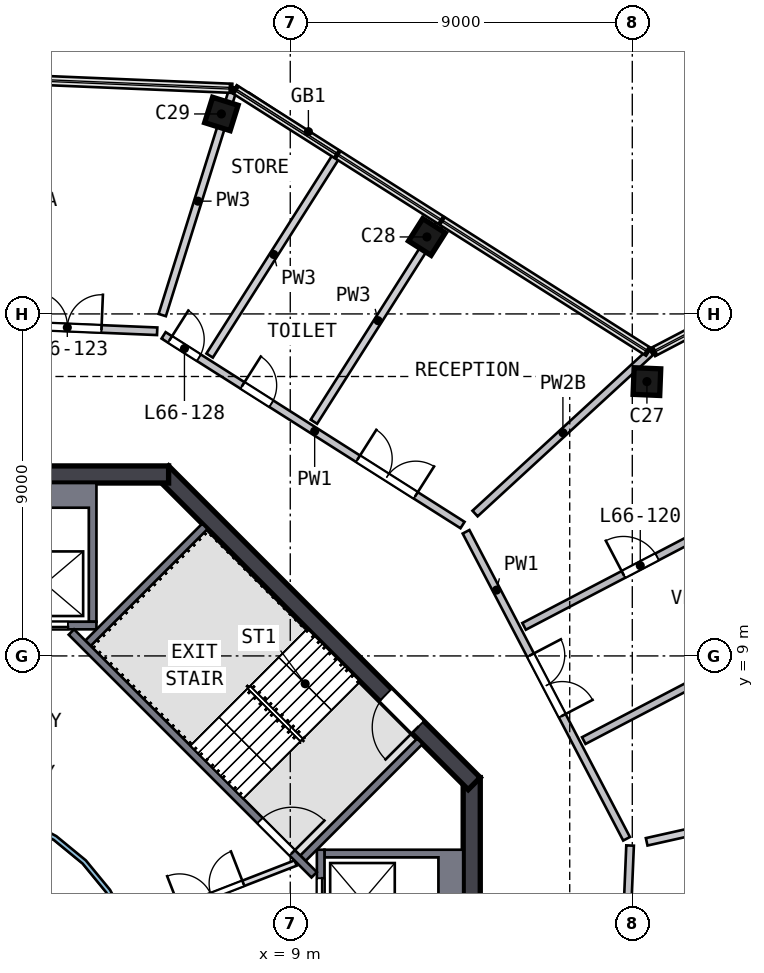
"""IFC4 building model, lengths in metres.
Left out: names, types, materials, properties, quantities, classifications, styles, units other than length and angle.
Written with IfcOpenShell. Run it as: python <this file> out.ifc"""

import sys

from ifc_helpers import new_model, si_unit, direction, frame, frame_2d, origin, origin_2d, place, context, subcontext, project, spatial, polyline, rectangle, outline, extrude, element, fill, save


model = new_model("IFC4")
c1 = context("Model", 3, precision=1e-05, world=origin(), true_north=direction((0.0, 1.0)))
c2 = subcontext(c1, "Body", "Model", "MODEL_VIEW")
j1 = project(units=[si_unit("LENGTHUNIT", "METRE"), si_unit("PLANEANGLEUNIT", "RADIAN")], contexts=[c1])
p1 = place(None, origin())
s1 = spatial("IfcSite", under=j1, at=p1, CompositionType="ELEMENT")
p2 = place(p1, origin())
s2 = spatial("IfcBuilding", under=s1, at=p2, CompositionType="ELEMENT")
p3 = place(p2, frame((0.0, 0.0, 269.0)))
s3 = spatial("IfcBuildingStorey", under=s2, at=p3, CompositionType="ELEMENT", Elevation=269.0)
p4 = place(p3, frame((18.451, 16.146, 0.0), z_axis=(-0.05447554, 0.061116367, 0.996642968), x_axis=(0.997671523, -0.037688421, 0.056842897)))
e1 = element("IfcColumn", 1, at=p4, inside=s3, PredefinedType="COLUMN", context=c2, shape_type="SweptSolid", body=[
    extrude(rectangle(XDim=0.7, YDim=0.7, at=origin_2d()), origin(), (0.0, 0.0, 1.0), 4.706),
])
p5 = place(p3, frame((12.677, 19.975, 0.0), z_axis=(-0.067097972, 0.041825959, 0.996869325), x_axis=(-0.841492395, 0.534452469, -0.079063944)))
e2 = element("IfcColumn", 2, at=p5, inside=s3, PredefinedType="COLUMN", context=c2, shape_type="SweptSolid", body=[
    extrude(rectangle(XDim=0.7, YDim=0.7, at=origin_2d()), origin(), (0.0, 0.0, 1.0), 4.705),
])
p6 = place(p3, frame((7.281, 23.234, 0.0), z_axis=(-0.077825577, 0.023658975, 0.996686226), x_axis=(0.951117562, -0.297924961, 0.081339413)))
e3 = element("IfcColumn", 3, at=p6, inside=s3, PredefinedType="COLUMN", context=c2, shape_type="SweptSolid", body=[
    extrude(rectangle(XDim=0.7, YDim=0.7, at=origin_2d()), origin(), (0.0, 0.0, 1.0), 4.706),
])
p7 = place(p3, frame((13.775, -5.799, 0.0), z_axis=(0.0, 0.0, 1.0), x_axis=(0.0, 1.0, 0.0)))
e4 = element("IfcWall", 4, at=p7, inside=s3, PredefinedType="SHEAR", context=c2, shape_type="SweptSolid", body=[
    extrude(rectangle(XDim=11.598, YDim=0.45, at=frame_2d((5.799, 0.0))), origin(), (0.0, 0.0, 1.0), 5.0),
])
p8 = place(p7, frame((4.899, 0.0, 0.0)))
e5 = element("IfcOpeningElement", 5, at=p8, cuts=e4, PredefinedType="OPENING", context=c2, shape_type="SweptSolid", body=[
    extrude(rectangle(XDim=1.8, YDim=2.1, at=frame_2d((0.9, 1.05))), frame((0.0, 0.235, 0.0), z_axis=(0.0, -1.0, 0.0), x_axis=(1.0, 0.0, 0.0)), (0.0, 0.0, 1.0), 0.47),
])
p9 = place(p3, frame((13.841, 5.64, 0.0), z_axis=(0.0, 0.0, 1.0), x_axis=(-0.707106781, 0.707106781, 0.0)))
e6 = element("IfcWall", 6, at=p9, inside=s3, PredefinedType="SHEAR", context=c2, shape_type="SweptSolid", body=[
    extrude(rectangle(XDim=11.598, YDim=0.45, at=frame_2d((5.799, 0.0))), origin(), (0.0, 0.0, 1.0), 5.0),
])
p10 = place(p9, frame((2.099, 0.0, 0.0)))
e7 = element("IfcOpeningElement", 7, at=p10, cuts=e6, PredefinedType="OPENING", context=c2, shape_type="SweptSolid", body=[
    extrude(rectangle(XDim=1.2, YDim=2.1, at=frame_2d((0.6, 1.05))), frame((0.0, 0.235, 0.0), z_axis=(0.0, -1.0, 0.0), x_axis=(1.0, 0.0, 0.0)), (0.0, 0.0, 1.0), 0.47),
])
p11 = place(p3, frame((5.799, 13.775, 0.0), z_axis=(0.0, 0.0, 1.0), x_axis=(-1.0, 0.0, 0.0)))
e8 = element("IfcWall", 8, at=p11, inside=s3, PredefinedType="SHEAR", context=c2, shape_type="SweptSolid", body=[
    extrude(rectangle(XDim=11.598, YDim=0.45, at=frame_2d((5.799, 0.0))), origin(), (0.0, 0.0, 1.0), 5.0),
])
p12 = place(p11, frame((4.899, 0.0, 0.0)))
e9 = element("IfcOpeningElement", 9, at=p12, cuts=e8, PredefinedType="OPENING", context=c2, shape_type="SweptSolid", body=[
    extrude(rectangle(XDim=1.8, YDim=2.1, at=frame_2d((0.9, 1.05))), frame((0.0, 0.235, 0.0), z_axis=(0.0, -1.0, 0.0), x_axis=(1.0, 0.0, 0.0)), (0.0, 0.0, 1.0), 0.47),
])
p13 = place(p3, origin())
e10 = element("IfcWall", 10, at=p13, inside=s3, PredefinedType="SOLIDWALL", context=c2, shape_type="SweptSolid", body=[
    extrude(outline(polyline([(13.55, 3.9), (13.55, 1.2), (9.9, 1.2), (9.9, 1.4), (12.9, 1.4), (12.9, 3.7), (9.9, 3.7), (9.9, 3.9), (13.55, 3.9)])), origin(), (0.0, 0.0, 1.0), 4.69),
])
p14 = place(p3, frame((9.8, 1.2, 0.0), z_axis=(0.0, 0.0, 1.0), x_axis=(0.0, 1.0, 0.0)))
e11 = element("IfcWall", 11, at=p14, inside=s3, PredefinedType="SOLIDWALL", context=c2, shape_type="SweptSolid", body=[
    extrude(rectangle(XDim=2.7, YDim=0.2, at=frame_2d((1.35, 0.0))), origin(), (0.0, 0.0, 1.0), 4.69),
])
p15 = place(p14, frame((0.75, 0.0, 0.0)))
e12 = element("IfcOpeningElement", 12, at=p15, cuts=e11, PredefinedType="OPENING", context=c2, shape_type="SweptSolid", body=[
    extrude(rectangle(XDim=1.2, YDim=2.1, at=frame_2d((0.6, 1.05))), frame((0.0, 0.11, 0.0), z_axis=(0.0, -1.0, 0.0), x_axis=(1.0, 0.0, 0.0)), (0.0, 0.0, 1.0), 0.22),
])
p16 = place(p3, origin())
e13 = element("IfcWall", 13, at=p16, inside=s3, PredefinedType="SOLIDWALL", context=c2, shape_type="SweptSolid", body=[
    extrude(outline(polyline([(3.9, 9.9), (3.7, 9.9), (3.7, 12.9), (1.4, 12.9), (1.4, 9.9), (1.2, 9.9), (1.2, 13.55), (3.9, 13.55), (3.9, 9.9)])), origin(), (0.0, 0.0, 1.0), 4.69),
])
p17 = place(p3, frame((1.2, 9.8, 0.0), z_axis=(0.0, 0.0, 1.0), x_axis=(1.0, 0.0, 0.0)))
e14 = element("IfcWall", 14, at=p17, inside=s3, PredefinedType="SOLIDWALL", context=c2, shape_type="SweptSolid", body=[
    extrude(rectangle(XDim=2.7, YDim=0.2, at=frame_2d((1.35, 0.0))), origin(), (0.0, 0.0, 1.0), 4.69),
])
p18 = place(p17, frame((0.75, 0.0, 0.0)))
e15 = element("IfcOpeningElement", 15, at=p18, cuts=e14, PredefinedType="OPENING", context=c2, shape_type="SweptSolid", body=[
    extrude(rectangle(XDim=1.2, YDim=2.1, at=frame_2d((0.6, 1.05))), frame((0.0, 0.11, 0.0), z_axis=(0.0, -1.0, 0.0), x_axis=(1.0, 0.0, 0.0)), (0.0, 0.0, 1.0), 0.22),
])
p19 = place(p3, frame((3.24, 9.629, 0.0), z_axis=(0.0, 0.0, 1.0), x_axis=(0.707106781, -0.707106781, 0.0)))
e16 = element("IfcWall", 16, at=p19, inside=s3, PredefinedType="SOLIDWALL", context=c2, shape_type="SweptSolid", body=[
    extrude(rectangle(XDim=9.036, YDim=0.2, at=frame_2d((4.518, 0.0))), origin(), (0.0, 0.0, 1.0), 4.69),
])
p20 = place(p19, frame((7.018, 0.0, 0.0)))
e17 = element("IfcOpeningElement", 17, at=p20, cuts=e16, PredefinedType="OPENING", context=c2, shape_type="SweptSolid", body=[
    extrude(rectangle(XDim=1.2, YDim=2.1, at=frame_2d((0.6, 1.05))), frame((0.0, 0.11, 0.0), z_axis=(0.0, -1.0, 0.0), x_axis=(1.0, 0.0, 0.0)), (0.0, 0.0, 1.0), 0.22),
])
for number, where, z_axis, x_axis in (
    (18, (9.334, 3.677, 0.0), (0.0, 0.0, 1.0), (0.707, 0.707, 0.0)),
    (19, (3.677, 9.334, 0.0), (0.0, 0.0, 1.0), (0.707, 0.707, 0.0)),
):
    element("IfcWall", number, at=place(p3, frame(where, z_axis=z_axis, x_axis=x_axis)), inside=s3, PredefinedType="SOLIDWALL", context=c2, shape_type="SweptSolid", body=[
        extrude(rectangle(XDim=4.35, YDim=0.2, at=frame_2d((2.175, 0.0))), origin(), (0.0, 0.0, 1.0), 4.69),
    ])
p21 = place(p3, frame((4.782, 1.857, 0.0), z_axis=(0.0, 0.0, 1.0), x_axis=(0.932167228, 0.36202798, 0.0)))
e20 = element("IfcWall", 20, at=p21, inside=s3, PredefinedType="PARTITIONING", context=c2, shape_type="SweptSolid", body=[
    extrude(rectangle(XDim=4.676, YDim=0.15, at=frame_2d((2.338, 0.0))), origin(), (0.0, 0.0, 1.0), 4.69),
])
p22 = place(p21, frame((1.4, 0.0, 0.0)))
e21 = element("IfcOpeningElement", 21, at=p22, cuts=e20, PredefinedType="OPENING", context=c2, shape_type="SweptSolid", body=[
    extrude(rectangle(XDim=1.8, YDim=2.1, at=frame_2d((0.9, 1.05))), frame((0.0, 0.085, 0.0), z_axis=(0.0, -1.0, 0.0), x_axis=(1.0, 0.0, 0.0)), (0.0, 0.0, 1.0), 0.17),
])
p23 = place(p3, origin())
e22 = element("IfcWall", 22, at=p23, inside=s3, PredefinedType="SOLIDWALL", context=c2, shape_type="SweptSolid", body=[
    extrude(outline(polyline([(5.021, -0.999), (4.73, -1.959), (4.257, -2.844), (3.62, -3.62), (2.844, -4.257), (1.959, -4.73), (0.999, -5.021), (0.0, -5.12), (-0.999, -5.021), (-1.959, -4.73), (-2.844, -4.257), (-3.62, -3.62), (-4.257, -2.844), (-4.73, -1.959), (-5.021, -0.999), (-5.12, 0.0), (-5.021, 0.999), (-4.73, 1.959), (-4.257, 2.844), (-3.62, 3.62), (-2.844, 4.257), (-1.959, 4.73), (-0.999, 5.021), (0.0, 5.12), (0.999, 5.021), (1.959, 4.73), (2.844, 4.257), (3.62, 3.62), (4.257, 2.844), (4.73, 1.959), (5.021, 0.999), (5.12, 0.0), (5.021, -0.999)]), holes=[polyline([(4.904, 0.976), (4.619, 1.913), (4.157, 2.778), (3.535, 3.535), (2.778, 4.157), (1.913, 4.619), (0.976, 4.904), (0.0, 5.0), (-0.976, 4.904), (-1.913, 4.619), (-2.778, 4.157), (-3.535, 3.535), (-4.157, 2.778), (-4.619, 1.913), (-4.904, 0.976), (-5.0, 0.0), (-4.904, -0.976), (-4.619, -1.913), (-4.157, -2.778), (-3.535, -3.535), (-2.778, -4.157), (-1.913, -4.619), (-0.976, -4.904), (0.0, -5.0), (0.976, -4.904), (1.913, -4.619), (2.778, -4.157), (3.535, -3.535), (4.157, -2.778), (4.619, -1.913), (4.904, -0.976), (5.0, 0.0), (4.904, 0.976)])]), origin(), (0.0, 0.0, 1.0), 4.69),
])
p24 = place(p3, frame((-4.01, 17.942, 0.0), z_axis=(0.0, 0.0, 1.0), x_axis=(0.999123175, -0.041867432, 0.0)))
e23 = element("IfcWall", 23, at=p24, inside=s3, PredefinedType="SOLIDWALL", context=c2, shape_type="SweptSolid", body=[
    extrude(rectangle(XDim=9.517, YDim=0.2, at=frame_2d((4.758, 0.0))), origin(), (0.0, 0.0, 1.0), 4.69),
])
p25 = place(p24, frame((6.25, 0.0, 0.0)))
e24 = element("IfcOpeningElement", 24, at=p25, cuts=e23, PredefinedType="OPENING", context=c2, shape_type="SweptSolid", body=[
    extrude(rectangle(XDim=1.8, YDim=2.1, at=frame_2d((0.9, 1.05))), frame((0.0, 0.11, 0.0), z_axis=(0.0, -1.0, 0.0), x_axis=(1.0, 0.0, 0.0)), (0.0, 0.0, 1.0), 0.22),
])
p26 = place(p3, frame((5.667, 17.436, 0.0), z_axis=(0.0, 0.0, 1.0), x_axis=(0.844321212, -0.535837373, 0.0)))
e25 = element("IfcWall", 25, at=p26, inside=s3, PredefinedType="SOLIDWALL", context=c2, shape_type="SweptSolid", body=[
    extrude(rectangle(XDim=9.317, YDim=0.2, at=frame_2d((4.658, 0.0))), origin(), (0.0, 0.0, 1.0), 4.69),
])
p27 = place(p26, frame((6.058, 0.0, 0.0)))
e26 = element("IfcOpeningElement", 26, at=p27, cuts=e25, PredefinedType="OPENING", context=c2, shape_type="SweptSolid", body=[
    extrude(rectangle(XDim=1.8, YDim=2.1, at=frame_2d((0.9, 1.05))), frame((0.0, 0.11, 0.0), z_axis=(0.0, -1.0, 0.0), x_axis=(1.0, 0.0, 0.0)), (0.0, 0.0, 1.0), 0.22),
])
p28 = place(p26, frame((2.458, 0.0, 0.0)))
e27 = element("IfcOpeningElement", 27, at=p28, cuts=e25, PredefinedType="OPENING", context=c2, shape_type="SweptSolid", body=[
    extrude(rectangle(XDim=0.9, YDim=2.1, at=frame_2d((0.45, 1.05))), frame((0.0, 0.11, 0.0), z_axis=(0.0, -1.0, 0.0), x_axis=(1.0, 0.0, 0.0)), (0.0, 0.0, 1.0), 0.22),
])
p29 = place(p26, frame((0.2, 0.0, 0.0)))
e28 = element("IfcOpeningElement", 28, at=p29, cuts=e25, PredefinedType="OPENING", context=c2, shape_type="SweptSolid", body=[
    extrude(rectangle(XDim=0.9, YDim=2.1, at=frame_2d((0.45, 1.05))), frame((0.0, 0.11, 0.0), z_axis=(0.0, -1.0, 0.0), x_axis=(1.0, 0.0, 0.0)), (0.0, 0.0, 1.0), 0.22),
])
p30 = place(p3, frame((13.625, 12.267, 0.0), z_axis=(0.0, 0.0, 1.0), x_axis=(0.463304399, -0.886199207, 0.0)))
e29 = element("IfcWall", 29, at=p30, inside=s3, PredefinedType="SOLIDWALL", context=c2, shape_type="SweptSolid", body=[
    extrude(rectangle(XDim=9.117, YDim=0.2, at=frame_2d((4.559, 0.0))), origin(), (0.0, 0.0, 1.0), 4.69),
])
p31 = place(p30, frame((3.663, 0.0, 0.0)))
e30 = element("IfcOpeningElement", 30, at=p31, cuts=e29, PredefinedType="OPENING", context=c2, shape_type="SweptSolid", body=[
    extrude(rectangle(XDim=1.8, YDim=2.1, at=frame_2d((0.9, 1.05))), frame((0.0, 0.11, 0.0), z_axis=(0.0, -1.0, 0.0), x_axis=(1.0, 0.0, 0.0)), (0.0, 0.0, 1.0), 0.22),
])
p32 = place(p3, frame((17.942, 4.01, 0.0), z_axis=(0.0, 0.0, 1.0), x_axis=(-0.041851823, -0.999123829, 0.0)))
e31 = element("IfcWall", 31, at=p32, inside=s3, PredefinedType="SOLIDWALL", context=c2, shape_type="SweptSolid", body=[
    extrude(rectangle(XDim=9.316, YDim=0.2, at=frame_2d((4.658, 0.0))), origin(), (0.0, 0.0, 1.0), 4.69),
])
p33 = place(p32, frame((6.258, 0.0, 0.0)))
e32 = element("IfcOpeningElement", 32, at=p33, cuts=e31, PredefinedType="OPENING", context=c2, shape_type="SweptSolid", body=[
    extrude(rectangle(XDim=1.8, YDim=2.1, at=frame_2d((0.9, 1.05))), frame((0.0, 0.11, 0.0), z_axis=(0.0, -1.0, 0.0), x_axis=(1.0, 0.0, 0.0)), (0.0, 0.0, 1.0), 0.22),
])
p34 = place(p32, frame((1.95, 0.0, 0.0)))
e33 = element("IfcOpeningElement", 33, at=p34, cuts=e31, PredefinedType="OPENING", context=c2, shape_type="SweptSolid", body=[
    extrude(rectangle(XDim=0.9, YDim=2.1, at=frame_2d((0.45, 1.05))), frame((0.0, 0.11, 0.0), z_axis=(0.0, -1.0, 0.0), x_axis=(1.0, 0.0, 0.0)), (0.0, 0.0, 1.0), 0.22),
])
p35 = place(p3, frame((13.862, 12.747, 0.0), z_axis=(0.0, 0.0, 1.0), x_axis=(0.736082037, 0.676892336, 0.0)))
e34 = element("IfcWall", 34, at=p35, inside=s3, PredefinedType="SOLIDWALL", context=c2, shape_type="SweptSolid", body=[
    extrude(rectangle(XDim=6.282, YDim=0.2, at=frame_2d((3.141, 0.0))), origin(), (0.0, 0.0, 1.0), 4.19),
])
p36 = place(p3, frame((15.153, 9.778, 0.0), z_axis=(0.0, 0.0, 1.0), x_axis=(0.886198556, 0.463305643, 0.0)))
e35 = element("IfcWall", 35, at=p36, inside=s3, PredefinedType="SOLIDWALL", context=c2, shape_type="SweptSolid", body=[
    extrude(rectangle(XDim=10.252, YDim=0.2, at=frame_2d((5.126, 0.0))), origin(), (0.0, 0.0, 1.0), 4.69),
])
p37 = place(p36, frame((2.95, 0.0, 0.0)))
e36 = element("IfcOpeningElement", 36, at=p37, cuts=e35, PredefinedType="OPENING", context=c2, shape_type="SweptSolid", body=[
    extrude(rectangle(XDim=1.0, YDim=2.1, at=frame_2d((0.5, 1.05))), frame((0.0, 0.11, 0.0), z_axis=(0.0, -1.0, 0.0), x_axis=(1.0, 0.0, 0.0)), (0.0, 0.0, 1.0), 0.22),
])
p38 = place(p3, frame((25.809, 11.522, 0.0), z_axis=(0.0, 0.0, 1.0), x_axis=(-0.886198556, -0.463305643, 0.0)))
e37 = element("IfcWall", 37, at=p38, inside=s3, PredefinedType="SOLIDWALL", context=c2, shape_type="SweptSolid", body=[
    extrude(rectangle(XDim=10.252, YDim=0.2, at=frame_2d((5.126, 0.0))), origin(), (0.0, 0.0, 1.0), 4.69),
])
p39 = place(p38, frame((2.45, 0.0, 0.0)))
e38 = element("IfcOpeningElement", 38, at=p39, cuts=e37, PredefinedType="OPENING", context=c2, shape_type="SweptSolid", body=[
    extrude(rectangle(XDim=1.0, YDim=2.1, at=frame_2d((0.5, 1.05))), frame((0.0, 0.11, 0.0), z_axis=(0.0, -1.0, 0.0), x_axis=(1.0, 0.0, 0.0)), (0.0, 0.0, 1.0), 0.22),
])
p40 = place(p3, frame((7.51, 23.965, 0.0), z_axis=(0.0, 0.0, 1.0), x_axis=(-0.299013997, -0.954248725, 0.0)))
e39 = element("IfcWall", 39, at=p40, inside=s3, PredefinedType="SOLIDWALL", context=c2, shape_type="SweptSolid", body=[
    extrude(rectangle(XDim=6.282, YDim=0.2, at=frame_2d((3.141, 0.0))), origin(), (0.0, 0.0, 1.0), 4.69),
])
p41 = place(p3, frame((6.878, 16.904, 0.0), z_axis=(0.0, 0.0, 1.0), x_axis=(0.535841972, 0.844318294, 0.0)))
e40 = element("IfcWall", 40, at=p41, inside=s3, PredefinedType="SOLIDWALL", context=c2, shape_type="SweptSolid", body=[
    extrude(rectangle(XDim=6.3, YDim=0.2, at=frame_2d((3.15, 0.0))), origin(), (0.0, 0.0, 1.0), 4.69),
])
p42 = place(p3, frame((9.623, 15.163, 0.0), z_axis=(0.0, 0.0, 1.0), x_axis=(0.535831878, 0.8443247, 0.0)))
e41 = element("IfcWall", 41, at=p42, inside=s3, PredefinedType="SOLIDWALL", context=c2, shape_type="SweptSolid", body=[
    extrude(rectangle(XDim=6.3, YDim=0.2, at=frame_2d((3.15, 0.0))), origin(), (0.0, 0.0, 1.0), 4.69),
])
p43 = place(p3, frame((24.509, 5.479, 0.0), z_axis=(0.0, 0.0, 1.0), x_axis=(-0.975918392, -0.218135948, 0.0)))
e42 = element("IfcWall", 42, at=p43, inside=s3, PredefinedType="SOLIDWALL", context=c2, shape_type="SweptSolid", body=[
    extrude(rectangle(XDim=6.282, YDim=0.2, at=frame_2d((3.141, 0.0))), origin(), (0.0, 0.0, 1.0), 4.69),
])
p44 = place(p15, origin())
e43 = element("IfcDoor", 43, at=p44, inside=s3, OperationType="DOUBLE_DOOR_SLIDING", PredefinedType="DOOR", context=c2, shape_type="SweptSolid", body=[
    extrude(rectangle(XDim=1.2, YDim=2.1, at=frame_2d((0.6, 1.05))), frame((0.0, 0.025, 0.0), z_axis=(0.0, -1.0, 0.0), x_axis=(1.0, 0.0, 0.0)), (0.0, 0.0, 1.0), 0.05),
])
fill(e12, e43)
p45 = place(p18, origin())
e44 = element("IfcDoor", 44, at=p45, inside=s3, OperationType="DOUBLE_DOOR_SLIDING", PredefinedType="DOOR", context=c2, shape_type="SweptSolid", body=[
    extrude(rectangle(XDim=1.2, YDim=2.1, at=frame_2d((0.6, 1.05))), frame((0.0, 0.025, 0.0), z_axis=(0.0, -1.0, 0.0), x_axis=(1.0, 0.0, 0.0)), (0.0, 0.0, 1.0), 0.05),
])
fill(e15, e44)
p46 = place(p20, origin())
e45 = element("IfcDoor", 45, at=p46, inside=s3, OperationType="SINGLE_SWING_RIGHT", PredefinedType="DOOR", context=c2, shape_type="SweptSolid", body=[
    extrude(rectangle(XDim=1.2, YDim=2.1, at=frame_2d((0.6, 1.05))), frame((0.0, 0.025, 0.0), z_axis=(0.0, -1.0, 0.0), x_axis=(1.0, 0.0, 0.0)), (0.0, 0.0, 1.0), 0.05),
])
fill(e17, e45)
p47 = place(p10, origin())
e46 = element("IfcDoor", 46, at=p47, inside=s3, OperationType="SINGLE_SWING_LEFT", PredefinedType="DOOR", context=c2, shape_type="SweptSolid", body=[
    extrude(rectangle(XDim=1.2, YDim=2.1, at=frame_2d((0.6, 1.05))), frame((0.0, 0.025, 0.0), z_axis=(0.0, -1.0, 0.0), x_axis=(1.0, 0.0, 0.0)), (0.0, 0.0, 1.0), 0.05),
])
fill(e7, e46)
p48 = place(p22, origin())
e47 = element("IfcDoor", 47, at=p48, inside=s3, OperationType="DOUBLE_DOOR_SINGLE_SWING", PredefinedType="DOOR", context=c2, shape_type="SweptSolid", body=[
    extrude(rectangle(XDim=1.8, YDim=2.1, at=frame_2d((0.9, 1.05))), frame((0.0, 0.025, 0.0), z_axis=(0.0, -1.0, 0.0), x_axis=(1.0, 0.0, 0.0)), (0.0, 0.0, 1.0), 0.05),
])
fill(e21, e47)
p49 = place(p31, origin())
e48 = element("IfcDoor", 48, at=p49, inside=s3, OperationType="DOUBLE_DOOR_SINGLE_SWING", PredefinedType="DOOR", context=c2, shape_type="SweptSolid", body=[
    extrude(rectangle(XDim=1.8, YDim=2.1, at=frame_2d((0.9, 1.05))), frame((0.0, 0.025, 0.0), z_axis=(0.0, -1.0, 0.0), x_axis=(1.0, 0.0, 0.0)), (0.0, 0.0, 1.0), 0.05),
])
fill(e30, e48)
p50 = place(p37, origin())
e49 = element("IfcDoor", 49, at=p50, inside=s3, OperationType="SINGLE_SWING_LEFT", PredefinedType="DOOR", context=c2, shape_type="SweptSolid", body=[
    extrude(rectangle(XDim=1.0, YDim=2.1, at=frame_2d((0.5, 1.05))), frame((0.0, 0.025, 0.0), z_axis=(0.0, -1.0, 0.0), x_axis=(1.0, 0.0, 0.0)), (0.0, 0.0, 1.0), 0.05),
])
fill(e36, e49)
p51 = place(p27, origin())
e50 = element("IfcDoor", 50, at=p51, inside=s3, OperationType="DOUBLE_DOOR_SINGLE_SWING", PredefinedType="DOOR", context=c2, shape_type="SweptSolid", body=[
    extrude(rectangle(XDim=1.8, YDim=2.1, at=frame_2d((0.9, 1.05))), frame((0.0, 0.025, 0.0), z_axis=(0.0, -1.0, 0.0), x_axis=(1.0, 0.0, 0.0)), (0.0, 0.0, 1.0), 0.05),
])
fill(e26, e50)
p52 = place(p25, origin())
e51 = element("IfcDoor", 51, at=p52, inside=s3, OperationType="DOUBLE_DOOR_SINGLE_SWING", PredefinedType="DOOR", context=c2, shape_type="SweptSolid", body=[
    extrude(rectangle(XDim=1.8, YDim=2.1, at=frame_2d((0.9, 1.05))), frame((0.0, 0.025, 0.0), z_axis=(0.0, -1.0, 0.0), x_axis=(1.0, 0.0, 0.0)), (0.0, 0.0, 1.0), 0.05),
])
fill(e24, e51)
p53 = place(p28, origin())
e52 = element("IfcDoor", 52, at=p53, inside=s3, OperationType="SINGLE_SWING_LEFT", PredefinedType="DOOR", context=c2, shape_type="SweptSolid", body=[
    extrude(rectangle(XDim=0.9, YDim=2.1, at=frame_2d((0.45, 1.05))), frame((0.0, 0.025, 0.0), z_axis=(0.0, -1.0, 0.0), x_axis=(1.0, 0.0, 0.0)), (0.0, 0.0, 1.0), 0.05),
])
fill(e27, e52)
p54 = place(p29, origin())
e53 = element("IfcDoor", 53, at=p54, inside=s3, OperationType="SINGLE_SWING_LEFT", PredefinedType="DOOR", context=c2, shape_type="SweptSolid", body=[
    extrude(rectangle(XDim=0.9, YDim=2.1, at=frame_2d((0.45, 1.05))), frame((0.0, 0.025, 0.0), z_axis=(0.0, -1.0, 0.0), x_axis=(1.0, 0.0, 0.0)), (0.0, 0.0, 1.0), 0.05),
])
fill(e28, e53)
save(model, sys.argv[1])
